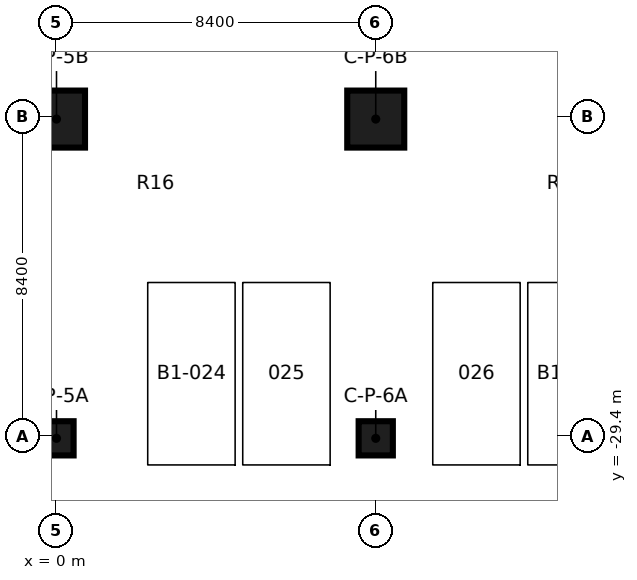
"""IFC4 building model, lengths in metres.
Left out: names, types, materials, properties, quantities, classifications, styles, units other than length and angle.
Written with IfcOpenShell. Run it as: python <this file> out.ifc"""

import sys

from ifc_helpers import new_model, si_unit, direction, frame, origin, origin_2d, place, context, subcontext, project, spatial, rectangle, extrude, element, save


model = new_model("IFC4")
c1 = context("Model", 3, precision=1e-05, world=origin(), true_north=direction((0.0, 1.0)))
c2 = subcontext(c1, "Body", "Model", "MODEL_VIEW")
j1 = project(units=[si_unit("LENGTHUNIT", "METRE"), si_unit("PLANEANGLEUNIT", "RADIAN")], contexts=[c1])
p1 = place(None, origin())
s1 = spatial("IfcSite", under=j1, at=p1, CompositionType="ELEMENT")
p2 = place(p1, origin())
s2 = spatial("IfcBuilding", under=s1, at=p2, CompositionType="ELEMENT")
p3 = place(p2, frame((0.0, 0.0, -5.0)))
s3 = spatial("IfcBuildingStorey", under=s2, at=p3, CompositionType="ELEMENT", Elevation=-5.0)
p4 = place(p3, frame((0.0, -29.4, 0.0), z_axis=(0.0, 0.0, 1.0), x_axis=(1.0, 0.0, 0.0)))
e1 = element("IfcColumn", 1, at=p4, inside=s3, PredefinedType="COLUMN", context=c2, shape_type="SweptSolid", body=[
    extrude(rectangle(XDim=0.9, YDim=0.9, at=origin_2d()), origin(), (0.0, 0.0, 1.0), 4.6),
])
p5 = place(p3, frame((0.0, -21.0, 0.0), z_axis=(0.0, 0.0, 1.0), x_axis=(1.0, 0.0, 0.0)))
e2 = element("IfcColumn", 2, at=p5, inside=s3, PredefinedType="COLUMN", context=c2, shape_type="SweptSolid", body=[
    extrude(rectangle(XDim=1.5, YDim=1.5, at=origin_2d()), origin(), (0.0, 0.0, 1.0), 4.6),
])
p6 = place(p3, frame((8.4, -29.4, 0.0), z_axis=(0.0, 0.0, 1.0), x_axis=(1.0, 0.0, 0.0)))
e3 = element("IfcColumn", 3, at=p6, inside=s3, PredefinedType="COLUMN", context=c2, shape_type="SweptSolid", body=[
    extrude(rectangle(XDim=0.9, YDim=0.9, at=origin_2d()), origin(), (0.0, 0.0, 1.0), 4.6),
])
p7 = place(p3, frame((8.4, -21.0, 0.0), z_axis=(0.0, 0.0, 1.0), x_axis=(1.0, 0.0, 0.0)))
e4 = element("IfcColumn", 4, at=p7, inside=s3, PredefinedType="COLUMN", context=c2, shape_type="SweptSolid", body=[
    extrude(rectangle(XDim=1.5, YDim=1.5, at=origin_2d()), origin(), (0.0, 0.0, 1.0), 4.6),
])
save(model, sys.argv[1])
